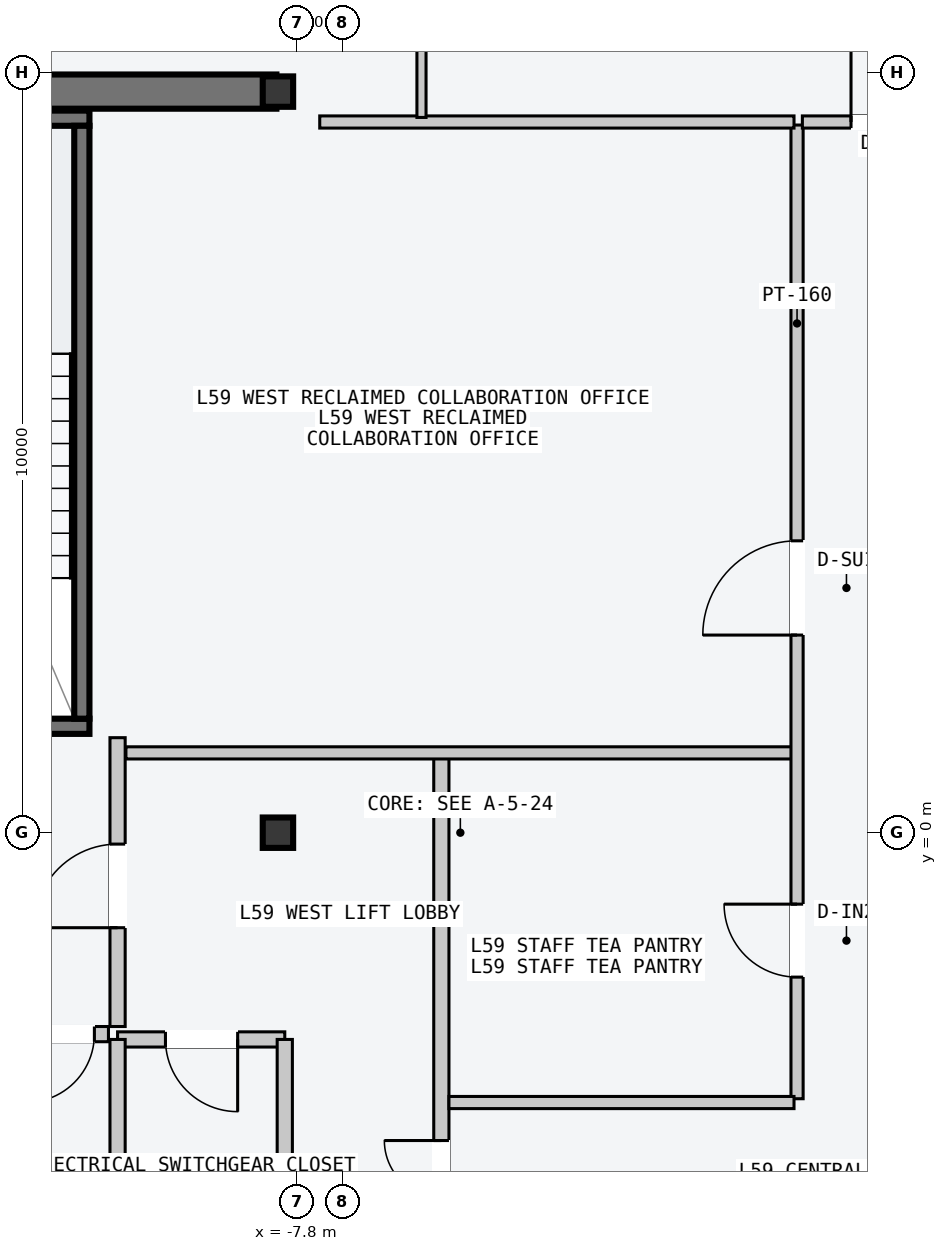
"""IFC4 building model, lengths in metres.
Left out: names, types, materials, properties, quantities, classifications, styles, units other than length and angle.
Written with IfcOpenShell. Run it as: python <this file> out.ifc"""

import sys

from ifc_helpers import new_model, si_unit, direction, frame, frame_2d, origin, origin_2d, place, context, subcontext, project, spatial, rectangle, i_section, extrude, element, fill, save


model = new_model("IFC4")
c1 = context("Model", 3, precision=1e-05, world=origin(), true_north=direction((0.0, 1.0)))
c2 = subcontext(c1, "Body", "Model", "MODEL_VIEW")
j1 = project(units=[si_unit("LENGTHUNIT", "METRE"), si_unit("PLANEANGLEUNIT", "RADIAN")], contexts=[c1])
p1 = place(None, origin())
s1 = spatial("IfcSite", under=j1, at=p1, CompositionType="ELEMENT")
p2 = place(p1, origin())
s2 = spatial("IfcBuilding", under=s1, at=p2, CompositionType="ELEMENT")
p3 = place(p2, frame((0.0, 0.0, 225.6)))
s3 = spatial("IfcBuildingStorey", under=s2, at=p3, CompositionType="ELEMENT", Elevation=225.6)
p4 = place(p3, frame((-14.53, 9.75, -0.2), z_axis=(0.0, 0.0, 1.0), x_axis=(1.0, 0.0, 0.0)))
e1 = element("IfcWall", 1, at=p4, inside=s3, PredefinedType="SHEAR", context=c2, shape_type="SweptSolid", body=[
    extrude(rectangle(XDim=6.46, YDim=0.45, at=frame_2d((3.23, 0.0))), origin(), (0.0, 0.0, 1.0), 3.6),
])
p5 = place(p3, frame((-14.25, 1.4, -0.2), z_axis=(0.0, 0.0, 1.0), x_axis=(1.0, 0.0, 0.0)))
e2 = element("IfcWall", 2, at=p5, inside=s3, PredefinedType="SOLIDWALL", context=c2, shape_type="SweptSolid", body=[
    extrude(rectangle(XDim=3.72, YDim=0.2, at=frame_2d((1.86, 0.0))), origin(), (0.0, 0.0, 1.0), 3.6),
])
p6 = place(p5, frame((1.5, 0.0, 0.2)))
e3 = element("IfcOpeningElement", 3, at=p6, cuts=e2, PredefinedType="OPENING", context=c2, shape_type="SweptSolid", body=[
    extrude(rectangle(XDim=1.12, YDim=2.18, at=frame_2d((0.56, 1.09))), frame((0.0, 0.11, 0.0), z_axis=(0.0, -1.0, 0.0), x_axis=(1.0, 0.0, 0.0)), (0.0, 0.0, 1.0), 0.22),
])
p7 = place(p3, frame((-14.25, 9.4, -0.2), z_axis=(0.0, 0.0, 1.0), x_axis=(1.0, 0.0, 0.0)))
e4 = element("IfcWall", 4, at=p7, inside=s3, PredefinedType="SOLIDWALL", context=c2, shape_type="SweptSolid", body=[
    extrude(rectangle(XDim=3.72, YDim=0.2, at=frame_2d((1.86, 0.0))), origin(), (0.0, 0.0, 1.0), 3.6),
])
p8 = place(p3, frame((-10.63, 1.5, -0.2), z_axis=(0.0, 0.0, 1.0), x_axis=(0.0, 1.0, 0.0)))
e5 = element("IfcWall", 5, at=p8, inside=s3, PredefinedType="SOLIDWALL", context=c2, shape_type="SweptSolid", body=[
    extrude(rectangle(XDim=7.8, YDim=0.2, at=frame_2d((3.9, 0.0))), origin(), (0.0, 0.0, 1.0), 3.6),
])
for number, where, z_axis, x_axis in (
    (6, (-8.05, 0.0, 0.0), (0.0, 0.0, 1.0), (1.0, 0.0, 0.0)),
    (7, (-8.05, 9.75, 0.0), (0.0, 0.0, 1.0), (1.0, 0.0, 0.0)),
):
    element("IfcColumn", number, at=place(p3, frame(where, z_axis=z_axis, x_axis=x_axis)), inside=s3, PredefinedType="COLUMN", context=c2, shape_type="SweptSolid", body=[
        extrude(i_section(OverallWidth=0.4, OverallDepth=0.4, WebThickness=0.013, FlangeThickness=0.021, at=origin_2d()), origin(), (0.0, 0.0, 1.0), 3.6),
    ])
p9 = place(p3, frame((-5.9, -9.45, 0.0), z_axis=(0.0, 0.0, 1.0), x_axis=(0.0, 1.0, 0.0)))
e8 = element("IfcWall", 8, at=p9, inside=s3, PredefinedType="PARTITIONING", context=c2, shape_type="SweptSolid", body=[
    extrude(rectangle(XDim=10.5, YDim=0.2, at=frame_2d((5.25, 0.0))), origin(), (0.0, 0.0, 1.0), 3.4),
])
p10 = place(p9, frame((3.9, 0.0, 0.0)))
e9 = element("IfcOpeningElement", 9, at=p10, cuts=e8, PredefinedType="OPENING", context=c2, shape_type="SweptSolid", body=[
    extrude(rectangle(XDim=1.5, YDim=2.2, at=frame_2d((0.75, 1.1))), frame((0.0, 0.11, 0.0), z_axis=(0.0, -1.0, 0.0), x_axis=(1.0, 0.0, 0.0)), (0.0, 0.0, 1.0), 0.22),
])
p11 = place(p3, frame((-10.16, -2.55, 0.0), z_axis=(0.0, 0.0, 1.0), x_axis=(0.0, 1.0, 0.0)))
e10 = element("IfcWall", 10, at=p11, inside=s3, PredefinedType="PARTITIONING", context=c2, shape_type="SweptSolid", body=[
    extrude(rectangle(XDim=3.8, YDim=0.2, at=frame_2d((1.9, 0.0))), origin(), (0.0, 0.0, 1.0), 3.4),
])
p12 = place(p11, frame((1.3, 0.0, 0.0)))
e11 = element("IfcOpeningElement", 11, at=p12, cuts=e10, PredefinedType="OPENING", context=c2, shape_type="SweptSolid", body=[
    extrude(rectangle(XDim=1.1, YDim=2.15, at=frame_2d((0.55, 1.075))), frame((0.0, 0.11, 0.0), z_axis=(0.0, -1.0, 0.0), x_axis=(1.0, 0.0, 0.0)), (0.0, 0.0, 1.0), 0.22),
])
p13 = place(p3, frame((-10.28, -2.65, 0.0), z_axis=(0.0, 0.0, 1.0), x_axis=(-1.0, 0.0, 0.0)))
e12 = element("IfcWall", 12, at=p13, inside=s3, PredefinedType="PARTITIONING", context=c2, shape_type="SweptSolid", body=[
    extrude(rectangle(XDim=1.27, YDim=0.2, at=frame_2d((0.635, 0.0))), origin(), (0.0, 0.0, 1.0), 3.4),
])
p14 = place(p13, frame((0.185, 0.0, 0.0)))
e13 = element("IfcOpeningElement", 13, at=p14, cuts=e12, PredefinedType="OPENING", context=c2, shape_type="SweptSolid", body=[
    extrude(rectangle(XDim=0.9, YDim=2.15, at=frame_2d((0.45, 1.075))), frame((0.0, 0.11, 0.0), z_axis=(0.0, -1.0, 0.0), x_axis=(1.0, 0.0, 0.0)), (0.0, 0.0, 1.0), 0.22),
])
p15 = place(p3, frame((-7.96, -2.72, 0.0), z_axis=(0.0, 0.0, 1.0), x_axis=(-1.0, 0.0, 0.0)))
e14 = element("IfcWall", 14, at=p15, inside=s3, PredefinedType="PARTITIONING", context=c2, shape_type="SweptSolid", body=[
    extrude(rectangle(XDim=2.2, YDim=0.2, at=frame_2d((1.1, 0.0))), origin(), (0.0, 0.0, 1.0), 3.4),
])
p16 = place(p15, frame((0.62, 0.0, 0.0)))
e15 = element("IfcOpeningElement", 15, at=p16, cuts=e14, PredefinedType="OPENING", context=c2, shape_type="SweptSolid", body=[
    extrude(rectangle(XDim=0.95, YDim=2.1, at=frame_2d((0.475, 1.05))), frame((0.0, 0.11, 0.0), z_axis=(0.0, -1.0, 0.0), x_axis=(1.0, 0.0, 0.0)), (0.0, 0.0, 1.0), 0.22),
])
for number, where, z_axis, x_axis in (
    (16, (-7.96, -5.16, 0.0), (0.0, 0.0, 1.0), (0.0, 1.0, 0.0)),
    (17, (-10.16, -5.16, 0.0), (0.0, 0.0, 1.0), (0.0, 1.0, 0.0)),
):
    element("IfcWall", number, at=place(p3, frame(where, z_axis=z_axis, x_axis=x_axis)), inside=s3, PredefinedType="PARTITIONING", context=c2, shape_type="SweptSolid", body=[
        extrude(rectangle(XDim=2.44, YDim=0.2, at=frame_2d((1.22, 0.0))), origin(), (0.0, 0.0, 1.0), 3.4),
    ])
p17 = place(p3, frame((-10.05, 1.05, 0.0), z_axis=(0.0, 0.0, 1.0), x_axis=(1.0, 0.0, 0.0)))
e18 = element("IfcWall", 18, at=p17, inside=s3, PredefinedType="PARTITIONING", context=c2, shape_type="SweptSolid", body=[
    extrude(rectangle(XDim=8.79, YDim=0.16, at=frame_2d((4.395, 0.0))), origin(), (0.0, 0.0, 1.0), 3.4),
])
p18 = place(p3, frame((-1.22, -3.5, 0.0), z_axis=(0.0, 0.0, 1.0), x_axis=(0.0, 1.0, 0.0)))
e19 = element("IfcWall", 19, at=p18, inside=s3, PredefinedType="PARTITIONING", context=c2, shape_type="SweptSolid", body=[
    extrude(rectangle(XDim=12.81, YDim=0.16, at=frame_2d((6.405, 0.0))), origin(), (0.0, 0.0, 1.0), 3.4),
])
p19 = place(p18, frame((6.1, 0.0, 0.0)))
e20 = element("IfcOpeningElement", 20, at=p19, cuts=e19, PredefinedType="OPENING", context=c2, shape_type="SweptSolid", body=[
    extrude(rectangle(XDim=1.24, YDim=2.24, at=frame_2d((0.62, 1.12))), frame((0.0, 0.09, 0.0), z_axis=(0.0, -1.0, 0.0), x_axis=(1.0, 0.0, 0.0)), (0.0, 0.0, 1.0), 0.18),
])
p20 = place(p18, frame((1.6, 0.0, 0.0)))
e21 = element("IfcOpeningElement", 21, at=p20, cuts=e19, PredefinedType="OPENING", context=c2, shape_type="SweptSolid", body=[
    extrude(rectangle(XDim=0.96, YDim=2.18, at=frame_2d((0.48, 1.09))), frame((0.0, 0.09, 0.0), z_axis=(0.0, -1.0, 0.0), x_axis=(1.0, 0.0, 0.0)), (0.0, 0.0, 1.0), 0.18),
])
p21 = place(p3, frame((-7.5, 9.35, 0.0), z_axis=(0.0, 0.0, 1.0), x_axis=(1.0, 0.0, 0.0)))
e22 = element("IfcWall", 22, at=p21, inside=s3, PredefinedType="PARTITIONING", context=c2, shape_type="SweptSolid", body=[
    extrude(rectangle(XDim=6.24, YDim=0.16, at=frame_2d((3.12, 0.0))), origin(), (0.0, 0.0, 1.0), 3.4),
])
p22 = place(p3, frame((-5.8, -3.55, 0.0), z_axis=(0.0, 0.0, 1.0), x_axis=(1.0, 0.0, 0.0)))
e23 = element("IfcWall", 23, at=p22, inside=s3, PredefinedType="PARTITIONING", context=c2, shape_type="SweptSolid", body=[
    extrude(rectangle(XDim=4.54, YDim=0.16, at=frame_2d((2.27, 0.0))), origin(), (0.0, 0.0, 1.0), 3.4),
])
p23 = place(p3, frame((-6.161, 9.41, 0.0), z_axis=(0.0, 0.0, 1.0), x_axis=(0.0, 1.0, 0.0)))
e24 = element("IfcWall", 24, at=p23, inside=s3, PredefinedType="PARTITIONING", context=c2, shape_type="SweptSolid", body=[
    extrude(rectangle(XDim=8.15, YDim=0.12, at=frame_2d((4.075, 0.0))), origin(), (0.0, 0.0, 1.0), 3.4),
])
p24 = place(p23, frame((1.15, 0.0, 0.0)))
e25 = element("IfcOpeningElement", 25, at=p24, cuts=e24, PredefinedType="OPENING", context=c2, shape_type="SweptSolid", body=[
    extrude(rectangle(XDim=0.96, YDim=2.18, at=frame_2d((0.48, 1.09))), frame((0.0, 0.07, 0.0), z_axis=(0.0, -1.0, 0.0), x_axis=(1.0, 0.0, 0.0)), (0.0, 0.0, 1.0), 0.14),
])
p25 = place(p3, frame((-1.15, 9.35, 0.0), z_axis=(0.0, 0.0, 1.0), x_axis=(1.0, 0.0, 0.0)))
e26 = element("IfcWall", 26, at=p25, inside=s3, PredefinedType="PARTITIONING", context=c2, shape_type="SweptSolid", body=[
    extrude(rectangle(XDim=2.3, YDim=0.16, at=frame_2d((1.15, 0.0))), origin(), (0.0, 0.0, 1.0), 3.4),
])
p26 = place(p25, frame((0.64, 0.0, 0.0)))
e27 = element("IfcOpeningElement", 27, at=p26, cuts=e26, PredefinedType="OPENING", context=c2, shape_type="SweptSolid", body=[
    extrude(rectangle(XDim=1.02, YDim=2.2, at=frame_2d((0.51, 1.1))), frame((0.0, 0.09, 0.0), z_axis=(0.0, -1.0, 0.0), x_axis=(1.0, 0.0, 0.0)), (0.0, 0.0, 1.0), 0.18),
])
p27 = place(p10, origin())
e28 = element("IfcDoor", 28, at=p27, inside=s3, OperationType="DOUBLE_DOOR_SINGLE_SWING", PredefinedType="DOOR", context=c2, shape_type="SweptSolid", body=[
    extrude(rectangle(XDim=1.5, YDim=2.2, at=frame_2d((0.75, 1.1))), frame((0.0, 0.025, 0.0), z_axis=(0.0, -1.0, 0.0), x_axis=(1.0, 0.0, 0.0)), (0.0, 0.0, 1.0), 0.05),
])
fill(e9, e28)
p28 = place(p12, origin())
e29 = element("IfcDoor", 29, at=p28, inside=s3, OperationType="SINGLE_SWING_LEFT", PredefinedType="DOOR", context=c2, shape_type="SweptSolid", body=[
    extrude(rectangle(XDim=1.1, YDim=2.15, at=frame_2d((0.55, 1.075))), frame((0.0, 0.025, 0.0), z_axis=(0.0, -1.0, 0.0), x_axis=(1.0, 0.0, 0.0)), (0.0, 0.0, 1.0), 0.05),
])
fill(e11, e29)
p29 = place(p14, origin())
e30 = element("IfcDoor", 30, at=p29, inside=s3, OperationType="SINGLE_SWING_RIGHT", PredefinedType="DOOR", context=c2, shape_type="SweptSolid", body=[
    extrude(rectangle(XDim=0.9, YDim=2.15, at=frame_2d((0.45, 1.075))), frame((0.0, 0.025, 0.0), z_axis=(0.0, -1.0, 0.0), x_axis=(1.0, 0.0, 0.0)), (0.0, 0.0, 1.0), 0.05),
])
fill(e13, e30)
p30 = place(p16, origin())
e31 = element("IfcDoor", 31, at=p30, inside=s3, OperationType="SINGLE_SWING_LEFT", PredefinedType="DOOR", context=c2, shape_type="SweptSolid", body=[
    extrude(rectangle(XDim=0.95, YDim=2.1, at=frame_2d((0.475, 1.05))), frame((0.0, 0.025, 0.0), z_axis=(0.0, -1.0, 0.0), x_axis=(1.0, 0.0, 0.0)), (0.0, 0.0, 1.0), 0.05),
])
fill(e15, e31)
p31 = place(p19, origin())
e32 = element("IfcDoor", 32, at=p31, inside=s3, OperationType="SINGLE_SWING_LEFT", PredefinedType="DOOR", context=c2, shape_type="SweptSolid", body=[
    extrude(rectangle(XDim=1.24, YDim=2.24, at=frame_2d((0.62, 1.12))), frame((0.0, 0.025, 0.0), z_axis=(0.0, -1.0, 0.0), x_axis=(1.0, 0.0, 0.0)), (0.0, 0.0, 1.0), 0.05),
])
fill(e20, e32)
p32 = place(p20, origin())
e33 = element("IfcDoor", 33, at=p32, inside=s3, OperationType="SINGLE_SWING_RIGHT", PredefinedType="DOOR", context=c2, shape_type="SweptSolid", body=[
    extrude(rectangle(XDim=0.96, YDim=2.18, at=frame_2d((0.48, 1.09))), frame((0.0, 0.025, 0.0), z_axis=(0.0, -1.0, 0.0), x_axis=(1.0, 0.0, 0.0)), (0.0, 0.0, 1.0), 0.05),
])
fill(e21, e33)
p33 = place(p26, origin())
e34 = element("IfcDoor", 34, at=p33, inside=s3, OperationType="SINGLE_SWING_LEFT", PredefinedType="DOOR", context=c2, shape_type="SweptSolid", body=[
    extrude(rectangle(XDim=1.02, YDim=2.2, at=frame_2d((0.51, 1.1))), frame((0.0, 0.025, 0.0), z_axis=(0.0, -1.0, 0.0), x_axis=(1.0, 0.0, 0.0)), (0.0, 0.0, 1.0), 0.05),
])
fill(e27, e34)
save(model, sys.argv[1])
